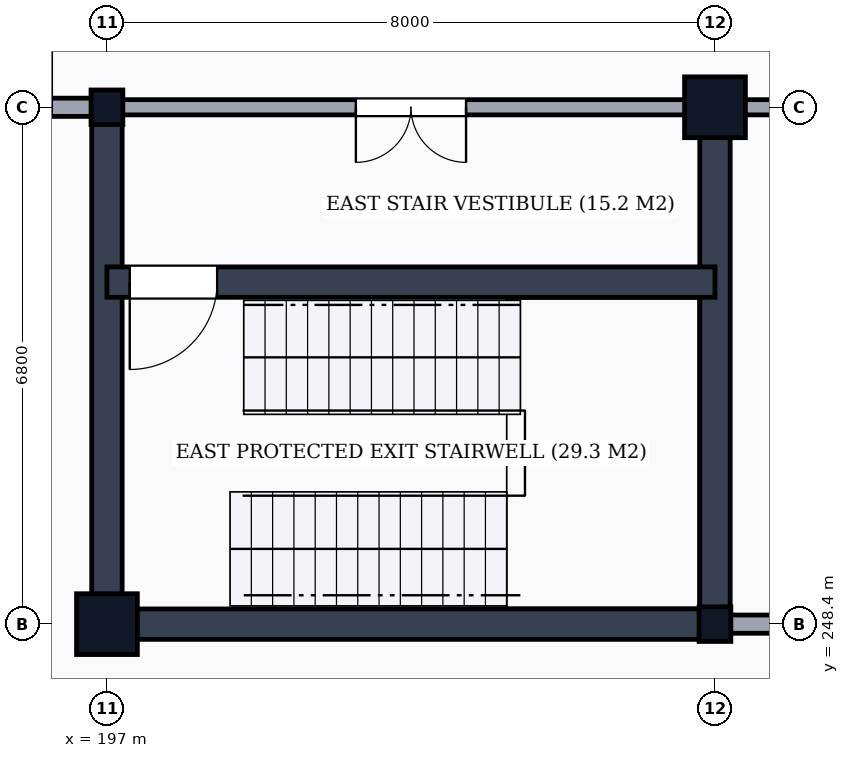
"""IFC4 building model, lengths in metres.
Left out: names, types, materials, properties, quantities, classifications, styles, units other than length and angle.
Written with IfcOpenShell. Run it as: python <this file> out.ifc"""

import sys

from ifc_helpers import new_model, si_unit, direction, frame, frame_2d, origin, origin_2d, place, context, subcontext, project, spatial, rectangle, i_section, extrude, element, fill, save


model = new_model("IFC4")
c1 = context("Model", 3, precision=1e-05, world=origin(), true_north=direction((0.0, 1.0)))
c2 = subcontext(c1, "Body", "Model", "MODEL_VIEW")
j1 = project(units=[si_unit("LENGTHUNIT", "METRE"), si_unit("PLANEANGLEUNIT", "RADIAN")], contexts=[c1])
p1 = place(None, origin())
s1 = spatial("IfcSite", under=j1, at=p1, CompositionType="ELEMENT")
p2 = place(p1, origin())
s2 = spatial("IfcBuilding", under=s1, at=p2, CompositionType="ELEMENT")
p3 = place(p2, frame((0.0, 0.0, -4.8)))
s3 = spatial("IfcBuildingStorey", under=s2, at=p3, CompositionType="ELEMENT", Elevation=-4.8)
p4 = place(p3, frame((197.0, 248.4, 0.0), z_axis=(0.0, 0.0, 1.0), x_axis=(1.0, 0.0, 0.0)))
e1 = element("IfcColumn", 1, at=p4, inside=s3, PredefinedType="COLUMN", context=c2, shape_type="SweptSolid", body=[
    extrude(rectangle(XDim=0.8, YDim=0.8, at=origin_2d()), origin(), (0.0, 0.0, 1.0), 4.8),
])
for number, where, z_axis, x_axis in (
    (2, (197.0, 255.2, 0.0), (0.0, 0.0, 1.0), (1.0, 0.0, 0.0)),
    (3, (205.0, 248.4, 0.0), (0.0, 0.0, 1.0), (1.0, 0.0, 0.0)),
):
    element("IfcColumn", number, at=place(p3, frame(where, z_axis=z_axis, x_axis=x_axis)), inside=s3, PredefinedType="COLUMN", context=c2, shape_type="SweptSolid", body=[
        extrude(i_section(OverallWidth=0.418, OverallDepth=0.455, WebThickness=0.042, FlangeThickness=0.068, FilletRadius=0.015, at=origin_2d()), origin(), (0.0, 0.0, 1.0), 4.8),
    ])
p5 = place(p3, frame((205.0, 255.2, 0.0), z_axis=(0.0, 0.0, 1.0), x_axis=(1.0, 0.0, 0.0)))
e4 = element("IfcColumn", 4, at=p5, inside=s3, PredefinedType="COLUMN", context=c2, shape_type="SweptSolid", body=[
    extrude(rectangle(XDim=0.8, YDim=0.8, at=origin_2d()), origin(), (0.0, 0.0, 1.0), 4.8),
])
p6 = place(p3, frame((197.0, 248.4, 0.0), z_axis=(0.0, 0.0, 1.0), x_axis=(1.0, 0.0, 0.0)))
e5 = element("IfcWall", 5, at=p6, inside=s3, PredefinedType="SHEAR", context=c2, shape_type="SweptSolid", body=[
    extrude(rectangle(XDim=8.0, YDim=0.4, at=frame_2d((4.0, 0.0))), origin(), (0.0, 0.0, 1.0), 4.51),
])
for number, where, z_axis, x_axis in (
    (6, (197.0, 248.4, 0.0), (0.0, 0.0, 1.0), (0.0, 1.0, 0.0)),
    (7, (205.0, 248.4, 0.0), (0.0, 0.0, 1.0), (0.0, 1.0, 0.0)),
):
    element("IfcWall", number, at=place(p3, frame(where, z_axis=z_axis, x_axis=x_axis)), inside=s3, PredefinedType="SHEAR", context=c2, shape_type="SweptSolid", body=[
        extrude(rectangle(XDim=6.8, YDim=0.4, at=frame_2d((3.4, 0.0))), origin(), (0.0, 0.0, 1.0), 4.51),
    ])
p7 = place(p3, frame((197.0, 252.9, 0.0), z_axis=(0.0, 0.0, 1.0), x_axis=(1.0, 0.0, 0.0)))
e8 = element("IfcWall", 8, at=p7, inside=s3, PredefinedType="SHEAR", context=c2, shape_type="SweptSolid", body=[
    extrude(rectangle(XDim=8.0, YDim=0.4, at=frame_2d((4.0, 0.0))), origin(), (0.0, 0.0, 1.0), 4.51),
])
p8 = place(p7, frame((0.3, 0.0, 0.0)))
e9 = element("IfcOpeningElement", 9, at=p8, cuts=e8, PredefinedType="OPENING", context=c2, shape_type="SweptSolid", body=[
    extrude(rectangle(XDim=1.15, YDim=2.15, at=frame_2d((0.575, 1.075))), frame((0.0, 0.215, 0.0), z_axis=(0.0, -1.0, 0.0), x_axis=(1.0, 0.0, 0.0)), (0.0, 0.0, 1.0), 0.43),
])
p9 = place(p3, frame((197.0, 255.2, 0.0), z_axis=(0.0, 0.0, 1.0), x_axis=(1.0, 0.0, 0.0)))
e10 = element("IfcWall", 10, at=p9, inside=s3, PredefinedType="PARTITIONING", context=c2, shape_type="SweptSolid", body=[
    extrude(rectangle(XDim=8.0, YDim=0.2, at=frame_2d((4.0, 0.0))), origin(), (0.0, 0.0, 1.0), 3.858),
])
p10 = place(p9, frame((3.275, 0.0, 0.0)))
e11 = element("IfcOpeningElement", 11, at=p10, cuts=e10, PredefinedType="OPENING", context=c2, shape_type="SweptSolid", body=[
    extrude(rectangle(XDim=1.45, YDim=2.2, at=frame_2d((0.725, 1.1))), frame((0.0, 0.115, 0.0), z_axis=(0.0, -1.0, 0.0), x_axis=(1.0, 0.0, 0.0)), (0.0, 0.0, 1.0), 0.23),
])
p11 = place(p3, frame((189.0, 255.2, 0.0), z_axis=(0.0, 0.0, 1.0), x_axis=(1.0, 0.0, 0.0)))
e12 = element("IfcWall", 12, at=p11, inside=s3, PredefinedType="PARTITIONING", context=c2, shape_type="SweptSolid", body=[
    extrude(rectangle(XDim=8.0, YDim=0.24, at=frame_2d((4.0, 0.0))), origin(), (0.0, 0.0, 1.0), 3.858),
])
p12 = place(p11, frame((1.05, 0.0, 0.0)))
e13 = element("IfcOpeningElement", 13, at=p12, cuts=e12, PredefinedType="OPENING", context=c2, shape_type="SweptSolid", body=[
    extrude(rectangle(XDim=1.0, YDim=2.1, at=frame_2d((0.5, 1.05))), frame((0.0, 0.135, 0.0), z_axis=(0.0, -1.0, 0.0), x_axis=(1.0, 0.0, 0.0)), (0.0, 0.0, 1.0), 0.27),
])
p13 = place(p11, frame((3.6, 0.0, 0.0)))
e14 = element("IfcOpeningElement", 14, at=p13, cuts=e12, PredefinedType="OPENING", context=c2, shape_type="SweptSolid", body=[
    extrude(rectangle(XDim=1.5, YDim=2.25, at=frame_2d((0.75, 1.125))), frame((0.0, 0.135, 0.0), z_axis=(0.0, -1.0, 0.0), x_axis=(1.0, 0.0, 0.0)), (0.0, 0.0, 1.0), 0.27),
])
p14 = place(p11, frame((6.425, 0.0, 0.0)))
e15 = element("IfcOpeningElement", 15, at=p14, cuts=e12, PredefinedType="OPENING", context=c2, shape_type="SweptSolid", body=[
    extrude(rectangle(XDim=0.85, YDim=2.1, at=frame_2d((0.425, 1.05))), frame((0.0, 0.135, 0.0), z_axis=(0.0, -1.0, 0.0), x_axis=(1.0, 0.0, 0.0)), (0.0, 0.0, 1.0), 0.27),
])
p15 = place(p3, frame((205.0, 248.4, 0.0), z_axis=(0.0, 0.0, 1.0), x_axis=(1.0, 0.0, 0.0)))
e16 = element("IfcWall", 16, at=p15, inside=s3, PredefinedType="PARTITIONING", context=c2, shape_type="SweptSolid", body=[
    extrude(rectangle(XDim=24.0, YDim=0.24, at=frame_2d((12.0, 0.0))), origin(), (0.0, 0.0, 1.0), 3.858),
])
p16 = place(p15, frame((11.2, 0.0, 0.0)))
e17 = element("IfcOpeningElement", 17, at=p16, cuts=e16, PredefinedType="OPENING", context=c2, shape_type="SweptSolid", body=[
    extrude(rectangle(XDim=1.6, YDim=2.1, at=frame_2d((0.8, 1.05))), frame((0.0, 0.135, 0.0), z_axis=(0.0, -1.0, 0.0), x_axis=(1.0, 0.0, 0.0)), (0.0, 0.0, 1.0), 0.27),
])
p17 = place(p3, frame((205.0, 255.2, 0.0), z_axis=(0.0, 0.0, 1.0), x_axis=(1.0, 0.0, 0.0)))
e18 = element("IfcWall", 18, at=p17, inside=s3, PredefinedType="PARTITIONING", context=c2, shape_type="SweptSolid", body=[
    extrude(rectangle(XDim=24.0, YDim=0.2, at=frame_2d((12.0, 0.0))), origin(), (0.0, 0.0, 1.0), 3.858),
])
p18 = place(p17, frame((5.45, 0.0, 0.0)))
e19 = element("IfcOpeningElement", 19, at=p18, cuts=e18, PredefinedType="OPENING", context=c2, shape_type="SweptSolid", body=[
    extrude(rectangle(XDim=1.1, YDim=2.1, at=frame_2d((0.55, 1.05))), frame((0.0, 0.115, 0.0), z_axis=(0.0, -1.0, 0.0), x_axis=(1.0, 0.0, 0.0)), (0.0, 0.0, 1.0), 0.23),
])
p19 = place(p17, frame((17.2, 0.0, 0.0)))
e20 = element("IfcOpeningElement", 20, at=p19, cuts=e18, PredefinedType="OPENING", context=c2, shape_type="SweptSolid", body=[
    extrude(rectangle(XDim=1.6, YDim=2.1, at=frame_2d((0.8, 1.05))), frame((0.0, 0.115, 0.0), z_axis=(0.0, -1.0, 0.0), x_axis=(1.0, 0.0, 0.0)), (0.0, 0.0, 1.0), 0.23),
])
p20 = place(p8, frame((1.15, 0.0, 0.0), z_axis=(0.0, 0.0, 1.0), x_axis=(-1.0, 0.0, 0.0)))
e21 = element("IfcDoor", 21, at=p20, inside=s3, OperationType="SINGLE_SWING_RIGHT", PredefinedType="DOOR", context=c2, shape_type="SweptSolid", body=[
    extrude(rectangle(XDim=1.15, YDim=2.15, at=frame_2d((0.575, 1.075))), frame((0.0, 0.025, 0.0), z_axis=(0.0, -1.0, 0.0), x_axis=(1.0, 0.0, 0.0)), (0.0, 0.0, 1.0), 0.05),
])
fill(e9, e21)
p21 = place(p10, frame((1.45, 0.0, 0.0), z_axis=(0.0, 0.0, 1.0), x_axis=(-1.0, 0.0, 0.0)))
e22 = element("IfcDoor", 22, at=p21, inside=s3, OperationType="DOUBLE_DOOR_SINGLE_SWING", PredefinedType="DOOR", context=c2, shape_type="SweptSolid", body=[
    extrude(rectangle(XDim=1.45, YDim=2.2, at=frame_2d((0.725, 1.1))), frame((0.0, 0.025, 0.0), z_axis=(0.0, -1.0, 0.0), x_axis=(1.0, 0.0, 0.0)), (0.0, 0.0, 1.0), 0.05),
])
fill(e11, e22)
save(model, sys.argv[1])
